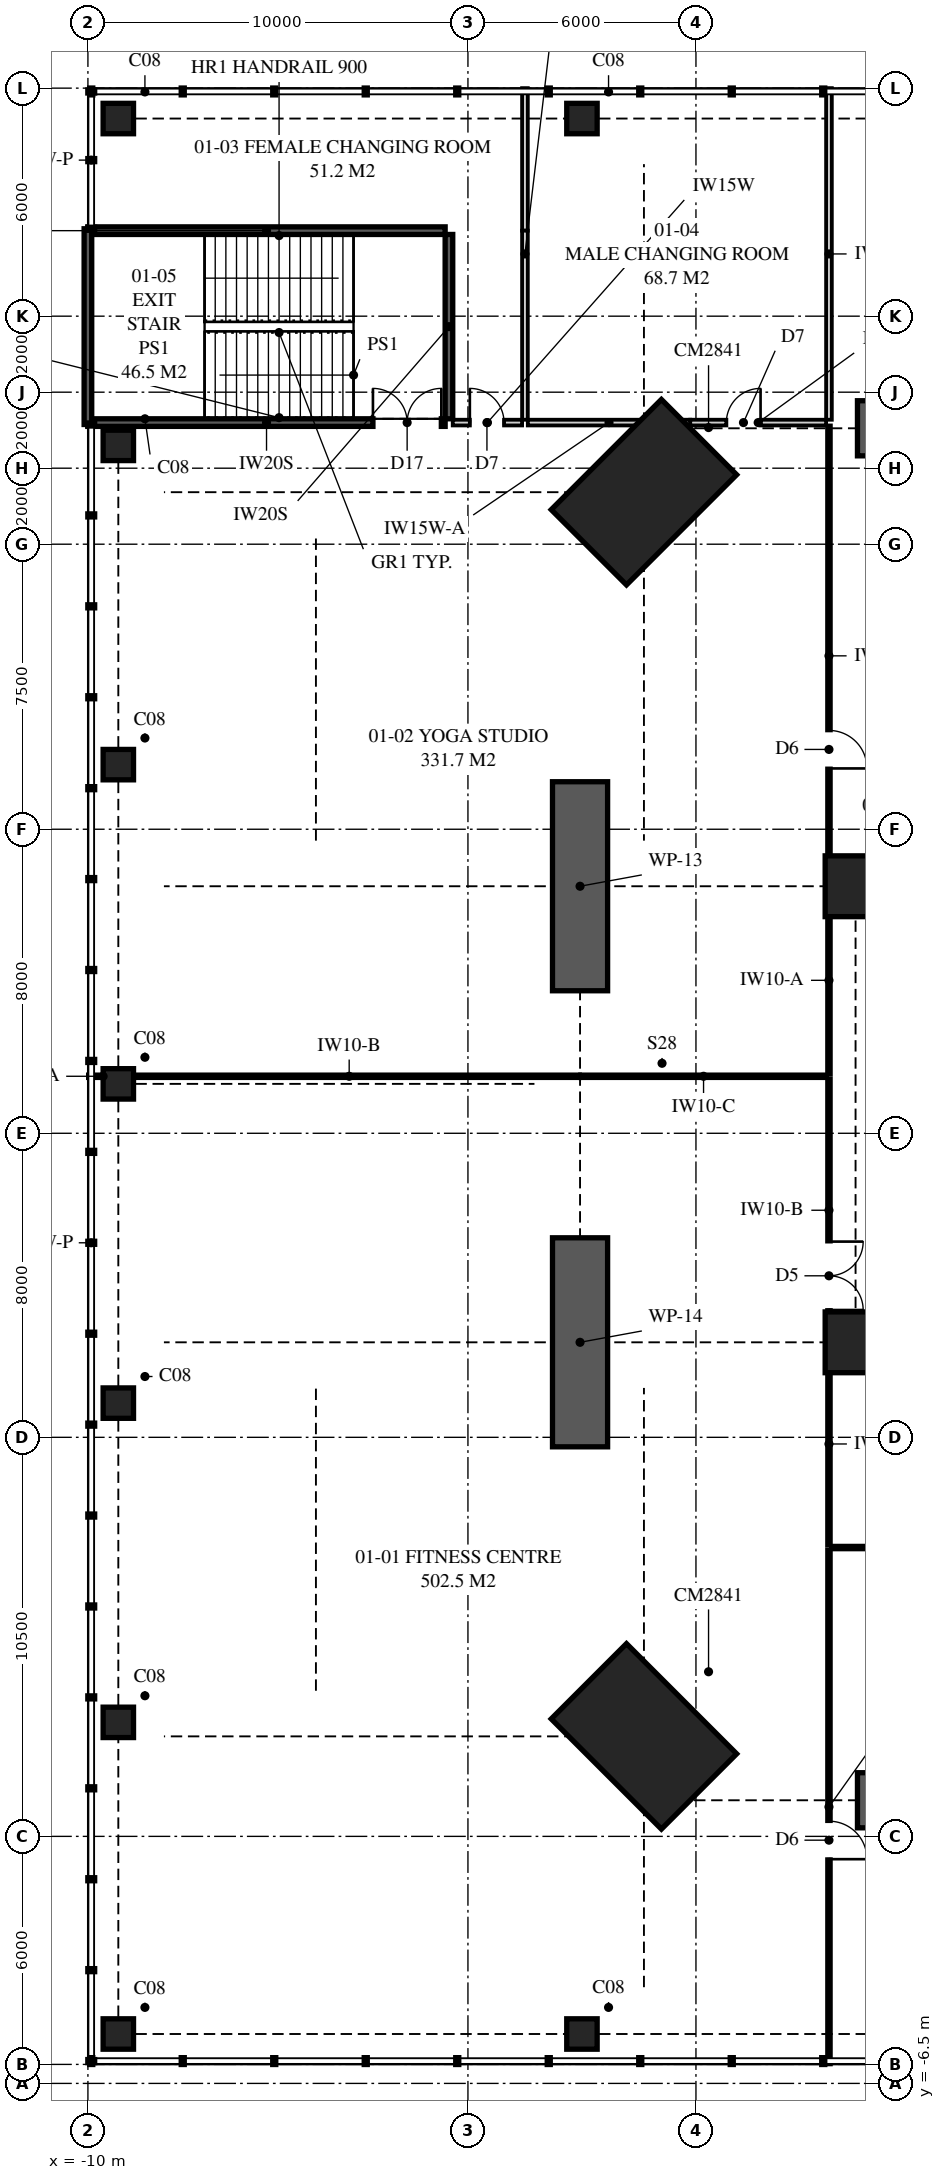
"""IFC4 building model, lengths in metres.
Left out: names, types, materials, properties, quantities, classifications, styles, units other than length and angle.
Written with IfcOpenShell. Run it as: python <this file> out.ifc"""

import sys

from ifc_helpers import new_model, si_unit, direction, frame, frame_2d, origin, origin_2d, place, context, subcontext, project, spatial, polyline, rectangle, outline, extrude, element, fill, save


model = new_model("IFC4")
c1 = context("Model", 3, precision=1e-05, world=origin(), true_north=direction((0.0, 1.0)))
c2 = subcontext(c1, "Body", "Model", "MODEL_VIEW")
j1 = project(units=[si_unit("LENGTHUNIT", "METRE"), si_unit("PLANEANGLEUNIT", "RADIAN")], contexts=[c1])
p1 = place(None, origin())
s1 = spatial("IfcSite", under=j1, at=p1, CompositionType="ELEMENT")
p2 = place(p1, origin())
s2 = spatial("IfcBuilding", under=s1, at=p2, CompositionType="ELEMENT")
p3 = place(p2, frame((0.0, 0.0, 6.0)))
s3 = spatial("IfcBuildingStorey", under=s2, at=p3, CompositionType="ELEMENT", Elevation=6.0)
for number, where, z_axis, x_axis in (
    (1, (4.631, 2.631, 0.0), (0.0, 0.0, 1.0), (0.707, 0.707, 0.0)),
    (2, (4.631, 35.369, 0.0), (0.0, 0.0, 1.0), (0.707, -0.707, 0.0)),
):
    element("IfcColumn", number, at=place(p3, frame(where, z_axis=z_axis, x_axis=x_axis)), inside=s3, PredefinedType="COLUMN", context=c2, shape_type="SweptSolid", body=[
        extrude(rectangle(XDim=2.8, YDim=4.1, at=origin_2d()), origin(), (0.0, 0.0, 1.0), 5.0),
    ])
for number, where, z_axis, x_axis in (
    (3, (10.2, 13.0, 0.0), (0.0, 0.0, 1.0), (1.0, 0.0, 0.0)),
    (4, (10.2, 25.0, 0.0), (0.0, 0.0, 1.0), (1.0, 0.0, 0.0)),
):
    element("IfcColumn", number, at=place(p3, frame(where, z_axis=z_axis, x_axis=x_axis)), inside=s3, PredefinedType="COLUMN", context=c2, shape_type="SweptSolid", body=[
        extrude(rectangle(XDim=1.6, YDim=1.6, at=origin_2d()), origin(), (0.0, 0.0, 1.0), 5.0),
    ])
for number, where, z_axis, x_axis in (
    (5, (-9.2, -5.2, 0.0), (0.0, 0.0, 1.0), (1.0, 0.0, 0.0)),
    (6, (3.0, -5.2, 0.0), (0.0, 0.0, 1.0), (1.0, 0.0, 0.0)),
    (7, (-9.2, 3.0, 0.0), (0.0, 0.0, 1.0), (1.0, 0.0, 0.0)),
    (8, (-9.2, 11.4, 0.0), (0.0, 0.0, 1.0), (1.0, 0.0, 0.0)),
    (9, (-9.2, 19.8, 0.0), (0.0, 0.0, 1.0), (1.0, 0.0, 0.0)),
    (10, (-9.2, 28.2, 0.0), (0.0, 0.0, 1.0), (1.0, 0.0, 0.0)),
    (11, (-9.2, 36.6, 0.0), (0.0, 0.0, 1.0), (1.0, 0.0, 0.0)),
    (12, (-9.2, 45.2, 0.0), (0.0, 0.0, 1.0), (1.0, 0.0, 0.0)),
    (13, (3.0, 45.2, 0.0), (0.0, 0.0, 1.0), (1.0, 0.0, 0.0)),
):
    element("IfcColumn", number, at=place(p3, frame(where, z_axis=z_axis, x_axis=x_axis)), inside=s3, PredefinedType="COLUMN", context=c2, shape_type="SweptSolid", body=[
        extrude(rectangle(XDim=0.8, YDim=0.8, at=origin_2d()), origin(), (0.0, 0.0, 1.0), 5.0),
    ])
p4 = place(p3, frame((-10.0, 42.3, 0.0), z_axis=(0.0, 0.0, 1.0), x_axis=(0.0, -1.0, 0.0)))
e14 = element("IfcWall", 14, at=p4, inside=s3, PredefinedType="SOLIDWALL", context=c2, shape_type="SweptSolid", body=[
    extrude(rectangle(XDim=5.15, YDim=0.2, at=frame_2d((2.575, 0.0))), origin(), (0.0, 0.0, 1.0), 5.0),
])
p5 = place(p3, frame((-10.0, 20.0, 0.0), z_axis=(0.0, 0.0, 1.0), x_axis=(1.0, 0.0, 0.0)))
e15 = element("IfcWall", 15, at=p5, inside=s3, PredefinedType="PARTITIONING", context=c2, shape_type="SweptSolid", body=[
    extrude(rectangle(XDim=0.8, YDim=0.1, at=frame_2d((0.4, 0.0))), origin(), (0.0, 0.0, 1.0), 4.12),
])
p6 = place(p3, frame((-9.2, 20.0, 0.0), z_axis=(0.0, 0.0, 1.0), x_axis=(1.0, 0.0, 0.0)))
e16 = element("IfcWall", 16, at=p6, inside=s3, PredefinedType="PARTITIONING", context=c2, shape_type="SweptSolid", body=[
    extrude(rectangle(XDim=12.15, YDim=0.1, at=frame_2d((6.075, 0.0))), origin(), (0.0, 0.0, 1.0), 4.12),
])
p7 = place(p3, frame((2.95, 20.0, 0.0), z_axis=(0.0, 0.0, 1.0), x_axis=(1.0, 0.0, 0.0)))
e17 = element("IfcWall", 17, at=p7, inside=s3, PredefinedType="PARTITIONING", context=c2, shape_type="SweptSolid", body=[
    extrude(outline(polyline([(0.0, 0.0), (6.5, 0.0), (6.5, 4.12), (5.99, 4.12), (5.99, 4.72), (1.26, 4.72), (1.26, 4.12), (0.0, 4.12), (0.0, 0.0)])), frame((0.0, 0.05, 0.0), z_axis=(0.0, -1.0, 0.0), x_axis=(1.0, 0.0, 0.0)), (0.0, 0.0, 1.0), 0.1),
])
p8 = place(p3, frame((9.5, 7.65, 0.0), z_axis=(0.0, 0.0, 1.0), x_axis=(0.0, 1.0, 0.0)))
e18 = element("IfcWall", 18, at=p8, inside=s3, PredefinedType="PARTITIONING", context=c2, shape_type="SweptSolid", body=[
    extrude(outline(polyline([(0.0, 0.0), (5.35, 0.0), (5.35, 4.12), (4.09, 4.12), (4.09, 4.72), (0.0, 4.72), (0.0, 0.0)])), frame((0.0, 0.05, 0.0), z_axis=(0.0, -1.0, 0.0), x_axis=(1.0, 0.0, 0.0)), (0.0, 0.0, 1.0), 0.1),
])
p9 = place(p3, frame((9.5, 13.0, 0.0), z_axis=(0.0, 0.0, 1.0), x_axis=(0.0, 1.0, 0.0)))
e19 = element("IfcWall", 19, at=p9, inside=s3, PredefinedType="PARTITIONING", context=c2, shape_type="SweptSolid", body=[
    extrude(rectangle(XDim=6.95, YDim=0.1, at=frame_2d((3.475, 0.0))), origin(), (0.0, 0.0, 1.0), 4.12),
])
p10 = place(p9, frame((0.85, 0.0, 0.0)))
e20 = element("IfcOpeningElement", 20, at=p10, cuts=e19, PredefinedType="OPENING", context=c2, shape_type="SweptSolid", body=[
    extrude(rectangle(XDim=1.8, YDim=2.1, at=frame_2d((0.9, 1.05))), frame((0.0, 0.06, 0.0), z_axis=(0.0, -1.0, 0.0), x_axis=(1.0, 0.0, 0.0)), (0.0, 0.0, 1.0), 0.12),
])
p11 = place(p3, frame((9.5, -6.0, 0.0), z_axis=(0.0, 0.0, 1.0), x_axis=(0.0, 1.0, 0.0)))
e21 = element("IfcWall", 21, at=p11, inside=s3, PredefinedType="PARTITIONING", context=c2, shape_type="SweptSolid", body=[
    extrude(outline(polyline([(0.0, 0.0), (13.55, 0.0), (13.55, 4.72), (8.21, 4.72), (8.21, 3.92), (5.69, 3.92), (5.69, 4.72), (2.06, 4.72), (2.06, 4.12), (0.0, 4.12), (0.0, 4.72), (0.0, 0.0)])), frame((0.0, 0.05, 0.0), z_axis=(0.0, -1.0, 0.0), x_axis=(1.0, 0.0, 0.0)), (0.0, 0.0, 1.0), 0.1),
])
p12 = place(p11, frame((5.4, 0.0, 0.0)))
e22 = element("IfcOpeningElement", 22, at=p12, cuts=e21, PredefinedType="OPENING", context=c2, shape_type="SweptSolid", body=[
    extrude(rectangle(XDim=1.0, YDim=2.1, at=frame_2d((0.5, 1.05))), frame((0.0, 0.06, 0.0), z_axis=(0.0, -1.0, 0.0), x_axis=(1.0, 0.0, 0.0)), (0.0, 0.0, 1.0), 0.12),
])
p13 = place(p3, frame((-0.4, 37.2, 0.0), z_axis=(0.0, 0.0, 1.0), x_axis=(1.0, 0.0, 0.0)))
e23 = element("IfcWall", 23, at=p13, inside=s3, PredefinedType="PLUMBINGWALL", context=c2, shape_type="SweptSolid", body=[
    extrude(rectangle(XDim=1.825, YDim=0.15, at=frame_2d((0.913, 0.0))), origin(), (0.0, 0.0, 1.0), 4.72),
])
p14 = place(p13, frame((0.45, 0.0, 0.0)))
e24 = element("IfcOpeningElement", 24, at=p14, cuts=e23, PredefinedType="OPENING", context=c2, shape_type="SweptSolid", body=[
    extrude(rectangle(XDim=0.9, YDim=2.1, at=frame_2d((0.45, 1.05))), frame((0.0, 0.085, 0.0), z_axis=(0.0, -1.0, 0.0), x_axis=(1.0, 0.0, 0.0)), (0.0, 0.0, 1.0), 0.17),
])
p15 = place(p3, frame((1.575, 37.2, 0.0), z_axis=(0.0, 0.0, 1.0), x_axis=(1.0, 0.0, 0.0)))
e25 = element("IfcWall", 25, at=p15, inside=s3, PredefinedType="PLUMBINGWALL", context=c2, shape_type="SweptSolid", body=[
    extrude(outline(polyline([(0.0, 0.0), (4.274, 0.0), (4.274, 4.12), (1.771, 4.12), (1.771, 4.72), (0.0, 4.72), (0.0, 0.0)])), frame((0.0, 0.075, 0.0), z_axis=(0.0, -1.0, 0.0), x_axis=(1.0, 0.0, 0.0)), (0.0, 0.0, 1.0), 0.15),
])
p16 = place(p3, frame((5.849, 37.2, 0.0), z_axis=(0.0, 0.0, 1.0), x_axis=(1.0, 0.0, 0.0)))
e26 = element("IfcWall", 26, at=p16, inside=s3, PredefinedType="PLUMBINGWALL", context=c2, shape_type="SweptSolid", body=[
    extrude(rectangle(XDim=3.576, YDim=0.15, at=frame_2d((1.788, 0.0))), origin(), (0.0, 0.0, 1.0), 3.92),
])
p17 = place(p16, frame((0.951, 0.0, 0.0)))
e27 = element("IfcOpeningElement", 27, at=p17, cuts=e26, PredefinedType="OPENING", context=c2, shape_type="SweptSolid", body=[
    extrude(rectangle(XDim=0.9, YDim=2.1, at=frame_2d((0.45, 1.05))), frame((0.0, 0.085, 0.0), z_axis=(0.0, -1.0, 0.0), x_axis=(1.0, 0.0, 0.0)), (0.0, 0.0, 1.0), 0.17),
])
p18 = place(p3, frame((-10.0, 37.2, 0.0), z_axis=(0.0, 0.0, 1.0), x_axis=(1.0, 0.0, 0.0)))
e28 = element("IfcWall", 28, at=p18, inside=s3, PredefinedType="SOLIDWALL", context=c2, shape_type="SweptSolid", body=[
    extrude(rectangle(XDim=9.4, YDim=0.2, at=frame_2d((4.7, 0.0))), origin(), (0.0, 0.0, 1.0), 5.0),
])
p19 = place(p18, frame((7.5, 0.0, 0.0)))
e29 = element("IfcOpeningElement", 29, at=p19, cuts=e28, PredefinedType="OPENING", context=c2, shape_type="SweptSolid", body=[
    extrude(rectangle(XDim=1.8, YDim=2.2, at=frame_2d((0.9, 1.1))), frame((0.0, 0.11, 0.0), z_axis=(0.0, -1.0, 0.0), x_axis=(1.0, 0.0, 0.0)), (0.0, 0.0, 1.0), 0.22),
])
p20 = place(p3, frame((9.5, 20.05, 0.0), z_axis=(0.0, 0.0, 1.0), x_axis=(0.0, 1.0, 0.0)))
e30 = element("IfcWall", 30, at=p20, inside=s3, PredefinedType="PARTITIONING", context=c2, shape_type="SweptSolid", body=[
    extrude(rectangle(XDim=4.95, YDim=0.1, at=frame_2d((2.475, 0.0))), origin(), (0.0, 0.0, 1.0), 4.12),
])
p21 = place(p3, frame((9.5, 25.0, 0.0), z_axis=(0.0, 0.0, 1.0), x_axis=(0.0, 1.0, 0.0)))
e31 = element("IfcWall", 31, at=p21, inside=s3, PredefinedType="PARTITIONING", context=c2, shape_type="SweptSolid", body=[
    extrude(outline(polyline([(0.0, 0.0), (12.125, 0.0), (12.125, 3.92), (10.79, 3.92), (10.79, 4.72), (1.26, 4.72), (1.26, 4.12), (0.0, 4.12), (0.0, 0.0)])), frame((0.0, 0.05, 0.0), z_axis=(0.0, -1.0, 0.0), x_axis=(1.0, 0.0, 0.0)), (0.0, 0.0, 1.0), 0.1),
])
p22 = place(p21, frame((3.1, 0.0, 0.0)))
e32 = element("IfcOpeningElement", 32, at=p22, cuts=e31, PredefinedType="OPENING", context=c2, shape_type="SweptSolid", body=[
    extrude(rectangle(XDim=1.0, YDim=2.1, at=frame_2d((0.5, 1.05))), frame((0.0, 0.06, 0.0), z_axis=(0.0, -1.0, 0.0), x_axis=(1.0, 0.0, 0.0)), (0.0, 0.0, 1.0), 0.12),
])
p23 = place(p3, frame((1.5, 37.275, 0.0), z_axis=(0.0, 0.0, 1.0), x_axis=(0.0, 1.0, 0.0)))
e33 = element("IfcWall", 33, at=p23, inside=s3, PredefinedType="PLUMBINGWALL", context=c2, shape_type="SweptSolid", body=[
    extrude(rectangle(XDim=4.975, YDim=0.15, at=frame_2d((2.488, 0.0))), origin(), (0.0, 0.0, 1.0), 4.72),
])
p24 = place(p3, frame((-0.5, 37.3, 0.0), z_axis=(0.0, 0.0, 1.0), x_axis=(0.0, 1.0, 0.0)))
e34 = element("IfcWall", 34, at=p24, inside=s3, PredefinedType="SOLIDWALL", context=c2, shape_type="SweptSolid", body=[
    extrude(rectangle(XDim=4.85, YDim=0.2, at=frame_2d((2.425, 0.0))), origin(), (0.0, 0.0, 1.0), 5.0),
])
p25 = place(p3, frame((1.5, 42.25, 0.0), z_axis=(0.0, 0.0, 1.0), x_axis=(0.0, 1.0, 0.0)))
e35 = element("IfcWall", 35, at=p25, inside=s3, PredefinedType="PLUMBINGWALL", context=c2, shape_type="SweptSolid", body=[
    extrude(outline(polyline([(0.0, 0.0), (3.75, 0.0), (3.75, 4.72), (3.75, 4.12), (1.665, 4.12), (1.665, 4.72), (0.0, 4.72), (0.0, 0.0)])), frame((0.0, 0.075, 0.0), z_axis=(0.0, -1.0, 0.0), x_axis=(1.0, 0.0, 0.0)), (0.0, 0.0, 1.0), 0.15),
])
p26 = place(p3, frame((-10.0, 42.25, 0.0), z_axis=(0.0, 0.0, 1.0), x_axis=(1.0, 0.0, 0.0)))
e36 = element("IfcWall", 36, at=p26, inside=s3, PredefinedType="SOLIDWALL", context=c2, shape_type="SweptSolid", body=[
    extrude(rectangle(XDim=9.4, YDim=0.2, at=frame_2d((4.7, 0.0))), origin(), (0.0, 0.0, 1.0), 5.0),
])
p27 = place(p3, frame((9.5, 37.275, 0.0), z_axis=(0.0, 0.0, 1.0), x_axis=(0.0, 1.0, 0.0)))
e37 = element("IfcWall", 37, at=p27, inside=s3, PredefinedType="PLUMBINGWALL", context=c2, shape_type="SweptSolid", body=[
    extrude(outline(polyline([(0.0, 0.0), (8.725, 0.0), (8.725, 4.72), (8.725, 4.12), (6.64, 4.12), (6.64, 4.72), (1.06, 4.72), (1.06, 3.92), (0.0, 3.92), (0.0, 4.72), (0.0, 0.0)])), frame((0.0, 0.075, 0.0), z_axis=(0.0, -1.0, 0.0), x_axis=(1.0, 0.0, 0.0)), (0.0, 0.0, 1.0), 0.15),
])
p28 = place(p3, frame((9.55, 7.6, 0.0), z_axis=(0.0, 0.0, 1.0), x_axis=(1.0, 0.0, 0.0)))
e38 = element("IfcWall", 38, at=p28, inside=s3, PredefinedType="PARTITIONING", context=c2, shape_type="SweptSolid", body=[
    extrude(outline(polyline([(0.0, 0.0), (7.95, 0.0), (7.95, 4.72), (4.71, 4.72), (4.71, 4.12), (2.19, 4.12), (2.19, 4.72), (0.0, 4.72), (0.0, 0.0)])), frame((0.0, 0.05, 0.0), z_axis=(0.0, -1.0, 0.0), x_axis=(1.0, 0.0, 0.0)), (0.0, 0.0, 1.0), 0.1),
])
p29 = place(p28, frame((3.5, 0.0, 0.0)))
e39 = element("IfcOpeningElement", 39, at=p29, cuts=e38, PredefinedType="OPENING", context=c2, shape_type="SweptSolid", body=[
    extrude(rectangle(XDim=1.0, YDim=2.1, at=frame_2d((0.5, 1.05))), frame((0.0, 0.06, 0.0), z_axis=(0.0, -1.0, 0.0), x_axis=(1.0, 0.0, 0.0)), (0.0, 0.0, 1.0), 0.12),
])
for number, where, z_axis, x_axis in (
    (40, (10.25, 0.95, 0.0), (0.0, 0.0, 1.0), (1.0, 0.0, 0.0)),
    (41, (10.25, 37.05, 0.0), (0.0, 0.0, 1.0), (1.0, 0.0, 0.0)),
    (42, (2.95, 22.25, 0.0), (0.0, 0.0, 1.0), (0.0, 1.0, 0.0)),
    (43, (2.95, 10.25, 0.0), (0.0, 0.0, 1.0), (0.0, 1.0, 0.0)),
):
    element("IfcWall", number, at=place(p3, frame(where, z_axis=z_axis, x_axis=x_axis)), inside=s3, PredefinedType="SHEAR", context=c2, shape_type="SweptSolid", body=[
        extrude(rectangle(XDim=5.5, YDim=1.45, at=frame_2d((2.75, 0.0))), origin(), (0.0, 0.0, 1.0), 5.0),
    ])
p30 = place(p10, frame((1.8, 0.0, 0.0), z_axis=(0.0, 0.0, 1.0), x_axis=(-1.0, 0.0, 0.0)))
e44 = element("IfcDoor", 44, at=p30, inside=s3, OperationType="DOUBLE_DOOR_SINGLE_SWING", PredefinedType="DOOR", context=c2, shape_type="SweptSolid", body=[
    extrude(rectangle(XDim=1.8, YDim=2.1, at=frame_2d((0.9, 1.05))), frame((0.0, 0.025, 0.0), z_axis=(0.0, -1.0, 0.0), x_axis=(1.0, 0.0, 0.0)), (0.0, 0.0, 1.0), 0.05),
])
fill(e20, e44)
p31 = place(p22, frame((1.0, 0.0, 0.0), z_axis=(0.0, 0.0, 1.0), x_axis=(-1.0, 0.0, 0.0)))
e45 = element("IfcDoor", 45, at=p31, inside=s3, OperationType="SINGLE_SWING_RIGHT", PredefinedType="DOOR", context=c2, shape_type="SweptSolid", body=[
    extrude(rectangle(XDim=1.0, YDim=2.1, at=frame_2d((0.5, 1.05))), frame((0.0, 0.025, 0.0), z_axis=(0.0, -1.0, 0.0), x_axis=(1.0, 0.0, 0.0)), (0.0, 0.0, 1.0), 0.05),
])
fill(e32, e45)
p32 = place(p14, origin())
e46 = element("IfcDoor", 46, at=p32, inside=s3, OperationType="SINGLE_SWING_LEFT", PredefinedType="DOOR", context=c2, shape_type="SweptSolid", body=[
    extrude(rectangle(XDim=0.9, YDim=2.1, at=frame_2d((0.45, 1.05))), frame((0.0, 0.025, 0.0), z_axis=(0.0, -1.0, 0.0), x_axis=(1.0, 0.0, 0.0)), (0.0, 0.0, 1.0), 0.05),
])
fill(e24, e46)
p33 = place(p17, origin())
e47 = element("IfcDoor", 47, at=p33, inside=s3, OperationType="SINGLE_SWING_RIGHT", PredefinedType="DOOR", context=c2, shape_type="SweptSolid", body=[
    extrude(rectangle(XDim=0.9, YDim=2.1, at=frame_2d((0.45, 1.05))), frame((0.0, 0.025, 0.0), z_axis=(0.0, -1.0, 0.0), x_axis=(1.0, 0.0, 0.0)), (0.0, 0.0, 1.0), 0.05),
])
fill(e27, e47)
p34 = place(p19, origin())
e48 = element("IfcDoor", 48, at=p34, inside=s3, OperationType="DOUBLE_DOOR_SINGLE_SWING", PredefinedType="DOOR", context=c2, shape_type="SweptSolid", body=[
    extrude(rectangle(XDim=1.8, YDim=2.2, at=frame_2d((0.9, 1.1))), frame((0.0, 0.025, 0.0), z_axis=(0.0, -1.0, 0.0), x_axis=(1.0, 0.0, 0.0)), (0.0, 0.0, 1.0), 0.05),
])
fill(e29, e48)
p35 = place(p12, frame((1.0, 0.0, 0.0), z_axis=(0.0, 0.0, 1.0), x_axis=(-1.0, 0.0, 0.0)))
e49 = element("IfcDoor", 49, at=p35, inside=s3, OperationType="SINGLE_SWING_RIGHT", PredefinedType="DOOR", context=c2, shape_type="SweptSolid", body=[
    extrude(rectangle(XDim=1.0, YDim=2.1, at=frame_2d((0.5, 1.05))), frame((0.0, 0.025, 0.0), z_axis=(0.0, -1.0, 0.0), x_axis=(1.0, 0.0, 0.0)), (0.0, 0.0, 1.0), 0.05),
])
fill(e22, e49)
save(model, sys.argv[1])
